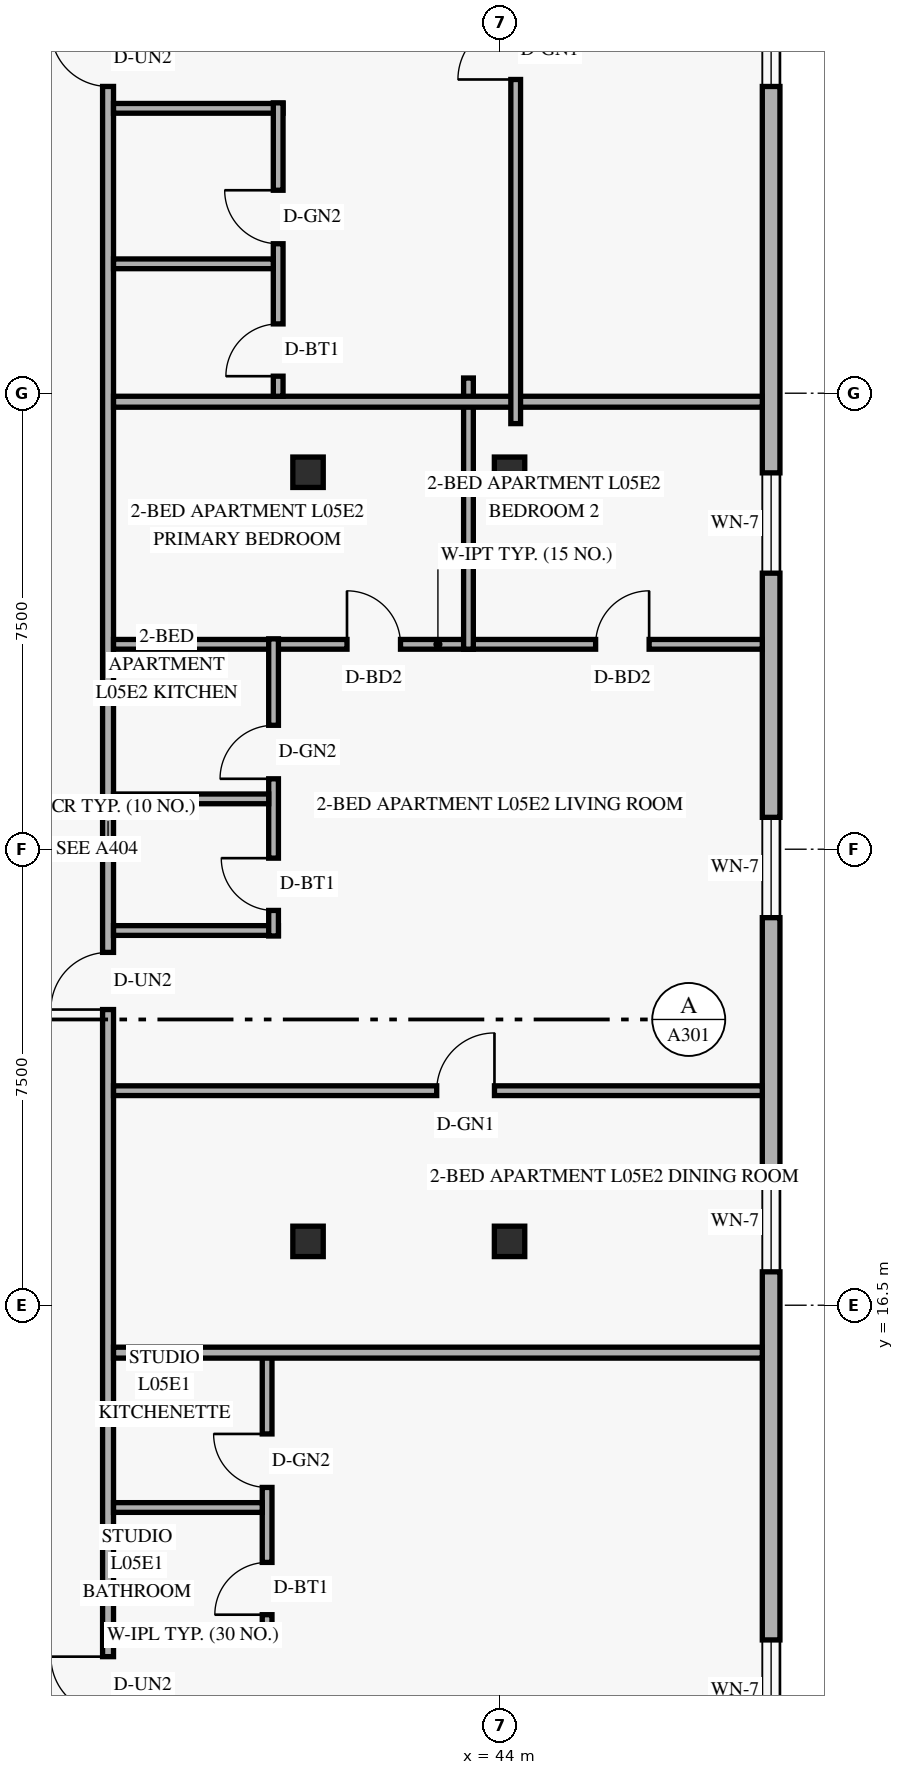
"""IFC4 building model, lengths in metres.
Left out: names, types, materials, properties, quantities, classifications, styles, units other than length and angle.
Written with IfcOpenShell. Run it as: python <this file> out.ifc"""

import sys

from ifc_helpers import new_model, si_unit, direction, frame, frame_2d, origin, origin_2d, place, context, subcontext, project, spatial, rectangle, hollow_rectangle, extrude, element, fill, save


model = new_model("IFC4")
c1 = context("Model", 3, precision=1e-05, world=origin(), true_north=direction((0.0, 1.0)))
c2 = subcontext(c1, "Body", "Model", "MODEL_VIEW")
j1 = project(units=[si_unit("LENGTHUNIT", "METRE"), si_unit("PLANEANGLEUNIT", "RADIAN")], contexts=[c1])
p1 = place(None, origin())
s1 = spatial("IfcSite", under=j1, at=p1, CompositionType="ELEMENT")
p2 = place(p1, origin())
s2 = spatial("IfcBuilding", under=s1, at=p2, CompositionType="ELEMENT")
p3 = place(p2, frame((0.0, 0.0, 24.0)))
s3 = spatial("IfcBuildingStorey", under=s2, at=p3, CompositionType="ELEMENT", Elevation=24.0)
for number, where, z_axis, x_axis in (
    (1, (40.776, 17.55, 0.0), (0.035, 0.0, 0.999), (0.0, 1.0, 0.0)),
    (2, (40.776, 30.2, 0.0), (0.035, 0.0, 0.999), (0.0, 1.0, 0.0)),
):
    element("IfcColumn", number, at=place(p3, frame(where, z_axis=z_axis, x_axis=x_axis)), inside=s3, PredefinedType="COLUMN", context=c2, shape_type="SweptSolid", body=[
        extrude(hollow_rectangle(XDim=0.5, YDim=0.5, WallThickness=0.022, at=origin_2d()), origin(), (0.0, 0.0, 1.0), 3.602),
    ])
for number, where, z_axis, x_axis in (
    (3, (44.049, 17.55, 0.0), (0.058, 0.0, 0.998), (0.0, 1.0, 0.0)),
    (4, (44.049, 30.2, 0.0), (0.058, 0.0, 0.998), (0.0, 1.0, 0.0)),
):
    element("IfcColumn", number, at=place(p3, frame(where, z_axis=z_axis, x_axis=x_axis)), inside=s3, PredefinedType="COLUMN", context=c2, shape_type="SweptSolid", body=[
        extrude(hollow_rectangle(XDim=0.5, YDim=0.5, WallThickness=0.022, at=origin_2d()), origin(), (0.0, 0.0, 1.0), 3.606),
    ])
p4 = place(p3, frame((48.455, 4.62, 0.0), z_axis=(0.0, 0.0, 1.0), x_axis=(0.0, 1.0, 0.0)))
e5 = element("IfcWall", 5, at=p4, inside=s3, PredefinedType="SOLIDWALL", context=c2, shape_type="SweptSolid", body=[
    extrude(rectangle(XDim=38.76, YDim=0.29, at=frame_2d((19.38, 0.0))), origin(), (0.0, 0.0, 1.0), 3.36),
])
p5 = place(p4, frame((4.725, 0.0, 0.85)))
e6 = element("IfcOpeningElement", 6, at=p5, cuts=e5, PredefinedType="OPENING", context=c2, shape_type="SweptSolid", body=[
    extrude(rectangle(XDim=1.65, YDim=1.6, at=frame_2d((0.825, 0.8))), frame((0.0, 0.155, 0.0), z_axis=(0.0, -1.0, 0.0), x_axis=(1.0, 0.0, 0.0)), (0.0, 0.0, 1.0), 0.31),
])
p6 = place(p4, frame((12.429, 0.0, 0.85)))
e7 = element("IfcOpeningElement", 7, at=p6, cuts=e5, PredefinedType="OPENING", context=c2, shape_type="SweptSolid", body=[
    extrude(rectangle(XDim=1.65, YDim=1.6, at=frame_2d((0.825, 0.8))), frame((0.0, 0.155, 0.0), z_axis=(0.0, -1.0, 0.0), x_axis=(1.0, 0.0, 0.0)), (0.0, 0.0, 1.0), 0.31),
])
p7 = place(p4, frame((18.254, 0.0, 0.85)))
e8 = element("IfcOpeningElement", 8, at=p7, cuts=e5, PredefinedType="OPENING", context=c2, shape_type="SweptSolid", body=[
    extrude(rectangle(XDim=1.65, YDim=1.6, at=frame_2d((0.825, 0.8))), frame((0.0, 0.155, 0.0), z_axis=(0.0, -1.0, 0.0), x_axis=(1.0, 0.0, 0.0)), (0.0, 0.0, 1.0), 0.31),
])
p8 = place(p4, frame((23.92, 0.0, 0.85)))
e9 = element("IfcOpeningElement", 9, at=p8, cuts=e5, PredefinedType="OPENING", context=c2, shape_type="SweptSolid", body=[
    extrude(rectangle(XDim=1.65, YDim=1.6, at=frame_2d((0.825, 0.8))), frame((0.0, 0.155, 0.0), z_axis=(0.0, -1.0, 0.0), x_axis=(1.0, 0.0, 0.0)), (0.0, 0.0, 1.0), 0.31),
])
p9 = place(p4, frame((31.925, 0.0, 0.85)))
e10 = element("IfcOpeningElement", 10, at=p9, cuts=e5, PredefinedType="OPENING", context=c2, shape_type="SweptSolid", body=[
    extrude(rectangle(XDim=1.65, YDim=1.6, at=frame_2d((0.825, 0.8))), frame((0.0, 0.155, 0.0), z_axis=(0.0, -1.0, 0.0), x_axis=(1.0, 0.0, 0.0)), (0.0, 0.0, 1.0), 0.31),
])
p10 = place(p3, frame((37.55, 1.29, 0.0), z_axis=(0.0, 0.0, 1.0), x_axis=(0.0, 1.0, 0.0)))
e11 = element("IfcWall", 11, at=p10, inside=s3, PredefinedType="STANDARD", context=c2, shape_type="SweptSolid", body=[
    extrude(rectangle(XDim=45.42, YDim=0.18, at=frame_2d((22.71, 0.0))), origin(), (0.0, 0.0, 1.0), 2.649),
])
p11 = place(p10, frame((8.49, 0.0, 0.0)))
e12 = element("IfcOpeningElement", 12, at=p11, cuts=e11, PredefinedType="OPENING", context=c2, shape_type="SweptSolid", body=[
    extrude(rectangle(XDim=0.94, YDim=2.15, at=frame_2d((0.47, 1.075))), frame((0.0, 0.1, 0.0), z_axis=(0.0, -1.0, 0.0), x_axis=(1.0, 0.0, 0.0)), (0.0, 0.0, 1.0), 0.2),
])
p12 = place(p10, frame((20.073, 0.0, 0.0)))
e13 = element("IfcOpeningElement", 13, at=p12, cuts=e11, PredefinedType="OPENING", context=c2, shape_type="SweptSolid", body=[
    extrude(rectangle(XDim=0.94, YDim=2.15, at=frame_2d((0.47, 1.075))), frame((0.0, 0.1, 0.0), z_axis=(0.0, -1.0, 0.0), x_axis=(1.0, 0.0, 0.0)), (0.0, 0.0, 1.0), 0.2),
])
p13 = place(p10, frame((35.256, 0.0, 0.0)))
e14 = element("IfcOpeningElement", 14, at=p13, cuts=e11, PredefinedType="OPENING", context=c2, shape_type="SweptSolid", body=[
    extrude(rectangle(XDim=0.94, YDim=2.15, at=frame_2d((0.47, 1.075))), frame((0.0, 0.1, 0.0), z_axis=(0.0, -1.0, 0.0), x_axis=(1.0, 0.0, 0.0)), (0.0, 0.0, 1.0), 0.2),
])
p14 = place(p3, frame((37.64, 11.08, 0.0), z_axis=(0.0, 0.0, 1.0), x_axis=(1.0, 0.0, 0.0)))
e15 = element("IfcWall", 15, at=p14, inside=s3, PredefinedType="PLUMBINGWALL", context=c2, shape_type="SweptSolid", body=[
    extrude(rectangle(XDim=2.606, YDim=0.16, at=frame_2d((1.303, 0.0))), origin(), (0.0, 0.0, 1.0), 3.36),
])
p15 = place(p3, frame((40.166, 10.99, 0.0), z_axis=(0.0, 0.0, 1.0), x_axis=(0.0, 1.0, 0.0)))
e16 = element("IfcWall", 16, at=p15, inside=s3, PredefinedType="PLUMBINGWALL", context=c2, shape_type="SweptSolid", body=[
    extrude(rectangle(XDim=4.73, YDim=0.16, at=frame_2d((2.365, 0.0))), origin(), (0.0, 0.0, 1.0), 2.932),
])
p16 = place(p15, frame((0.42, 0.0, 0.0)))
e17 = element("IfcOpeningElement", 17, at=p16, cuts=e16, PredefinedType="OPENING", context=c2, shape_type="SweptSolid", body=[
    extrude(rectangle(XDim=0.86, YDim=2.12, at=frame_2d((0.43, 1.06))), frame((0.0, 0.09, 0.0), z_axis=(0.0, -1.0, 0.0), x_axis=(1.0, 0.0, 0.0)), (0.0, 0.0, 1.0), 0.18),
])
p17 = place(p15, frame((2.513, 0.0, 0.0)))
e18 = element("IfcOpeningElement", 18, at=p17, cuts=e16, PredefinedType="OPENING", context=c2, shape_type="SweptSolid", body=[
    extrude(rectangle(XDim=0.88, YDim=2.12, at=frame_2d((0.44, 1.06))), frame((0.0, 0.09, 0.0), z_axis=(0.0, -1.0, 0.0), x_axis=(1.0, 0.0, 0.0)), (0.0, 0.0, 1.0), 0.18),
])
p18 = place(p3, frame((37.64, 13.173, 0.0), z_axis=(0.0, 0.0, 1.0), x_axis=(1.0, 0.0, 0.0)))
e19 = element("IfcWall", 19, at=p18, inside=s3, PredefinedType="PLUMBINGWALL", context=c2, shape_type="SweptSolid", body=[
    extrude(rectangle(XDim=2.446, YDim=0.16, at=frame_2d((1.223, 0.0))), origin(), (0.0, 0.0, 1.0), 3.36),
])
p19 = place(p3, frame((37.64, 15.72, 0.0), z_axis=(0.0, 0.0, 1.0), x_axis=(1.0, 0.0, 0.0)))
e20 = element("IfcWall", 20, at=p19, inside=s3, PredefinedType="PARTITIONING", context=c2, shape_type="SweptSolid", body=[
    extrude(rectangle(XDim=10.67, YDim=0.18, at=frame_2d((5.335, 0.0))), origin(), (0.0, 0.0, 1.0), 2.649),
])
p20 = place(p3, frame((37.64, 27.37, 0.0), z_axis=(0.0, 0.0, 1.0), x_axis=(1.0, 0.0, 0.0)))
e21 = element("IfcWall", 21, at=p20, inside=s3, PredefinedType="PARTITIONING", context=c2, shape_type="SweptSolid", body=[
    extrude(rectangle(XDim=10.67, YDim=0.16, at=frame_2d((5.335, 0.0))), origin(), (0.0, 0.0, 1.0), 2.649),
])
p21 = place(p20, frame((3.84, 0.0, 0.0)))
e22 = element("IfcOpeningElement", 22, at=p21, cuts=e21, PredefinedType="OPENING", context=c2, shape_type="SweptSolid", body=[
    extrude(rectangle(XDim=0.88, YDim=2.14, at=frame_2d((0.44, 1.07))), frame((0.0, 0.09, 0.0), z_axis=(0.0, -1.0, 0.0), x_axis=(1.0, 0.0, 0.0)), (0.0, 0.0, 1.0), 0.18),
])
p22 = place(p20, frame((7.929, 0.0, 0.0)))
e23 = element("IfcOpeningElement", 23, at=p22, cuts=e21, PredefinedType="OPENING", context=c2, shape_type="SweptSolid", body=[
    extrude(rectangle(XDim=0.88, YDim=2.14, at=frame_2d((0.44, 1.07))), frame((0.0, 0.09, 0.0), z_axis=(0.0, -1.0, 0.0), x_axis=(1.0, 0.0, 0.0)), (0.0, 0.0, 1.0), 0.18),
])
p23 = place(p3, frame((37.64, 22.663, 0.0), z_axis=(0.0, 0.0, 1.0), x_axis=(1.0, 0.0, 0.0)))
e24 = element("IfcWall", 24, at=p23, inside=s3, PredefinedType="PLUMBINGWALL", context=c2, shape_type="SweptSolid", body=[
    extrude(rectangle(XDim=2.712, YDim=0.16, at=frame_2d((1.356, 0.0))), origin(), (0.0, 0.0, 1.0), 3.36),
])
p24 = place(p3, frame((40.272, 22.573, 0.0), z_axis=(0.0, 0.0, 1.0), x_axis=(0.0, 1.0, 0.0)))
e25 = element("IfcWall", 25, at=p24, inside=s3, PredefinedType="PLUMBINGWALL", context=c2, shape_type="SweptSolid", body=[
    extrude(rectangle(XDim=4.887, YDim=0.16, at=frame_2d((2.443, 0.0))), origin(), (0.0, 0.0, 1.0), 3.36),
])
p25 = place(p24, frame((0.42, 0.0, 0.0)))
e26 = element("IfcOpeningElement", 26, at=p25, cuts=e25, PredefinedType="OPENING", context=c2, shape_type="SweptSolid", body=[
    extrude(rectangle(XDim=0.86, YDim=2.12, at=frame_2d((0.43, 1.06))), frame((0.0, 0.09, 0.0), z_axis=(0.0, -1.0, 0.0), x_axis=(1.0, 0.0, 0.0)), (0.0, 0.0, 1.0), 0.18),
])
p26 = place(p24, frame((2.585, 0.0, 0.0)))
e27 = element("IfcOpeningElement", 27, at=p26, cuts=e25, PredefinedType="OPENING", context=c2, shape_type="SweptSolid", body=[
    extrude(rectangle(XDim=0.88, YDim=2.12, at=frame_2d((0.44, 1.06))), frame((0.0, 0.09, 0.0), z_axis=(0.0, -1.0, 0.0), x_axis=(1.0, 0.0, 0.0)), (0.0, 0.0, 1.0), 0.18),
])
p27 = place(p3, frame((37.64, 24.828, 0.0), z_axis=(0.0, 0.0, 1.0), x_axis=(1.0, 0.0, 0.0)))
e28 = element("IfcWall", 28, at=p27, inside=s3, PredefinedType="PLUMBINGWALL", context=c2, shape_type="SweptSolid", body=[
    extrude(rectangle(XDim=2.552, YDim=0.16, at=frame_2d((1.276, 0.0))), origin(), (0.0, 0.0, 1.0), 3.36),
])
p28 = place(p3, frame((37.64, 20.029, 0.0), z_axis=(0.0, 0.0, 1.0), x_axis=(1.0, 0.0, 0.0)))
e29 = element("IfcWall", 29, at=p28, inside=s3, PredefinedType="PARTITIONING", context=c2, shape_type="SweptSolid", body=[
    extrude(rectangle(XDim=10.67, YDim=0.16, at=frame_2d((5.335, 0.0))), origin(), (0.0, 0.0, 1.0), 2.649),
])
p29 = place(p28, frame((5.315, 0.0, 0.0)))
e30 = element("IfcOpeningElement", 30, at=p29, cuts=e29, PredefinedType="OPENING", context=c2, shape_type="SweptSolid", body=[
    extrude(rectangle(XDim=0.95, YDim=2.15, at=frame_2d((0.475, 1.075))), frame((0.0, 0.09, 0.0), z_axis=(0.0, -1.0, 0.0), x_axis=(1.0, 0.0, 0.0)), (0.0, 0.0, 1.0), 0.18),
])
p30 = place(p3, frame((43.477, 27.29, 0.0), z_axis=(0.0, 0.0, 1.0), x_axis=(0.0, 1.0, 0.0)))
e31 = element("IfcWall", 31, at=p30, inside=s3, PredefinedType="PARTITIONING", context=c2, shape_type="SweptSolid", body=[
    extrude(rectangle(XDim=4.46, YDim=0.16, at=frame_2d((2.23, 0.0))), origin(), (0.0, 0.0, 1.0), 2.649),
])
p31 = place(p3, frame((37.64, 31.36, 0.0), z_axis=(0.0, 0.0, 1.0), x_axis=(1.0, 0.0, 0.0)))
e32 = element("IfcWall", 32, at=p31, inside=s3, PredefinedType="PARTITIONING", context=c2, shape_type="SweptSolid", body=[
    extrude(rectangle(XDim=10.67, YDim=0.18, at=frame_2d((5.335, 0.0))), origin(), (0.0, 0.0, 1.0), 2.649),
])
p32 = place(p3, frame((37.64, 36.186, 0.0), z_axis=(0.0, 0.0, 1.0), x_axis=(1.0, 0.0, 0.0)))
e33 = element("IfcWall", 33, at=p32, inside=s3, PredefinedType="PLUMBINGWALL", context=c2, shape_type="SweptSolid", body=[
    extrude(rectangle(XDim=2.788, YDim=0.16, at=frame_2d((1.394, 0.0))), origin(), (0.0, 0.0, 1.0), 3.36),
])
p33 = place(p3, frame((40.348, 31.45, 0.0), z_axis=(0.0, 0.0, 1.0), x_axis=(0.0, 1.0, 0.0)))
e34 = element("IfcWall", 34, at=p33, inside=s3, PredefinedType="PLUMBINGWALL", context=c2, shape_type="SweptSolid", body=[
    extrude(rectangle(XDim=4.825, YDim=0.16, at=frame_2d((2.413, 0.0))), origin(), (0.0, 0.0, 1.0), 2.932),
])
p34 = place(p33, frame((0.33, 0.0, 0.0)))
e35 = element("IfcOpeningElement", 35, at=p34, cuts=e34, PredefinedType="OPENING", context=c2, shape_type="SweptSolid", body=[
    extrude(rectangle(XDim=0.86, YDim=2.12, at=frame_2d((0.43, 1.06))), frame((0.0, 0.09, 0.0), z_axis=(0.0, -1.0, 0.0), x_axis=(1.0, 0.0, 0.0)), (0.0, 0.0, 1.0), 0.18),
])
p35 = place(p33, frame((2.508, 0.0, 0.0)))
e36 = element("IfcOpeningElement", 36, at=p35, cuts=e34, PredefinedType="OPENING", context=c2, shape_type="SweptSolid", body=[
    extrude(rectangle(XDim=0.88, YDim=2.12, at=frame_2d((0.44, 1.06))), frame((0.0, 0.09, 0.0), z_axis=(0.0, -1.0, 0.0), x_axis=(1.0, 0.0, 0.0)), (0.0, 0.0, 1.0), 0.18),
])
p36 = place(p3, frame((37.64, 33.628, 0.0), z_axis=(0.0, 0.0, 1.0), x_axis=(1.0, 0.0, 0.0)))
e37 = element("IfcWall", 37, at=p36, inside=s3, PredefinedType="PLUMBINGWALL", context=c2, shape_type="SweptSolid", body=[
    extrude(rectangle(XDim=2.628, YDim=0.16, at=frame_2d((1.314, 0.0))), origin(), (0.0, 0.0, 1.0), 3.36),
])
p37 = place(p3, frame((44.254, 31.0, 0.0), z_axis=(0.0, 0.0, 1.0), x_axis=(0.0, 1.0, 0.0)))
e38 = element("IfcWall", 38, at=p37, inside=s3, PredefinedType="PARTITIONING", context=c2, shape_type="SweptSolid", body=[
    extrude(rectangle(XDim=12.84, YDim=0.16, at=frame_2d((6.42, 0.0))), origin(), (0.0, 0.0, 1.0), 2.809),
])
p38 = place(p37, frame((5.66, 0.0, 0.0)))
e39 = element("IfcOpeningElement", 39, at=p38, cuts=e38, PredefinedType="OPENING", context=c2, shape_type="SweptSolid", body=[
    extrude(rectangle(XDim=0.95, YDim=2.15, at=frame_2d((0.475, 1.075))), frame((0.0, 0.09, 0.0), z_axis=(0.0, -1.0, 0.0), x_axis=(1.0, 0.0, 0.0)), (0.0, 0.0, 1.0), 0.18),
])
p39 = place(p5, origin())
e40 = element("IfcWindow", 40, at=p39, inside=s3, PartitioningType="SINGLE_PANEL", PredefinedType="WINDOW", context=c2, shape_type="SweptSolid", body=[
    extrude(rectangle(XDim=1.65, YDim=1.6, at=frame_2d((0.825, 0.8))), frame((0.0, 0.03, 0.0), z_axis=(0.0, -1.0, 0.0), x_axis=(1.0, 0.0, 0.0)), (0.0, 0.0, 1.0), 0.06),
])
fill(e6, e40)
p40 = place(p6, origin())
e41 = element("IfcWindow", 41, at=p40, inside=s3, PartitioningType="SINGLE_PANEL", PredefinedType="WINDOW", context=c2, shape_type="SweptSolid", body=[
    extrude(rectangle(XDim=1.65, YDim=1.6, at=frame_2d((0.825, 0.8))), frame((0.0, 0.03, 0.0), z_axis=(0.0, -1.0, 0.0), x_axis=(1.0, 0.0, 0.0)), (0.0, 0.0, 1.0), 0.06),
])
fill(e7, e41)
p41 = place(p7, origin())
e42 = element("IfcWindow", 42, at=p41, inside=s3, PartitioningType="SINGLE_PANEL", PredefinedType="WINDOW", context=c2, shape_type="SweptSolid", body=[
    extrude(rectangle(XDim=1.65, YDim=1.6, at=frame_2d((0.825, 0.8))), frame((0.0, 0.03, 0.0), z_axis=(0.0, -1.0, 0.0), x_axis=(1.0, 0.0, 0.0)), (0.0, 0.0, 1.0), 0.06),
])
fill(e8, e42)
p42 = place(p8, origin())
e43 = element("IfcWindow", 43, at=p42, inside=s3, PartitioningType="SINGLE_PANEL", PredefinedType="WINDOW", context=c2, shape_type="SweptSolid", body=[
    extrude(rectangle(XDim=1.65, YDim=1.6, at=frame_2d((0.825, 0.8))), frame((0.0, 0.03, 0.0), z_axis=(0.0, -1.0, 0.0), x_axis=(1.0, 0.0, 0.0)), (0.0, 0.0, 1.0), 0.06),
])
fill(e9, e43)
p43 = place(p9, origin())
e44 = element("IfcWindow", 44, at=p43, inside=s3, PartitioningType="SINGLE_PANEL", PredefinedType="WINDOW", context=c2, shape_type="SweptSolid", body=[
    extrude(rectangle(XDim=1.65, YDim=1.6, at=frame_2d((0.825, 0.8))), frame((0.0, 0.03, 0.0), z_axis=(0.0, -1.0, 0.0), x_axis=(1.0, 0.0, 0.0)), (0.0, 0.0, 1.0), 0.06),
])
fill(e10, e44)
p44 = place(p11, origin())
e45 = element("IfcDoor", 45, at=p44, inside=s3, OperationType="SINGLE_SWING_RIGHT", PredefinedType="DOOR", context=c2, shape_type="SweptSolid", body=[
    extrude(rectangle(XDim=0.94, YDim=2.15, at=frame_2d((0.47, 1.075))), frame((0.0, 0.025, 0.0), z_axis=(0.0, -1.0, 0.0), x_axis=(1.0, 0.0, 0.0)), (0.0, 0.0, 1.0), 0.05),
])
fill(e12, e45)
p45 = place(p16, origin())
e46 = element("IfcDoor", 46, at=p45, inside=s3, OperationType="SINGLE_SWING_LEFT", PredefinedType="DOOR", context=c2, shape_type="SweptSolid", body=[
    extrude(rectangle(XDim=0.86, YDim=2.12, at=frame_2d((0.43, 1.06))), frame((0.0, 0.025, 0.0), z_axis=(0.0, -1.0, 0.0), x_axis=(1.0, 0.0, 0.0)), (0.0, 0.0, 1.0), 0.05),
])
fill(e17, e46)
p46 = place(p17, origin())
e47 = element("IfcDoor", 47, at=p46, inside=s3, OperationType="SINGLE_SWING_RIGHT", PredefinedType="DOOR", context=c2, shape_type="SweptSolid", body=[
    extrude(rectangle(XDim=0.88, YDim=2.12, at=frame_2d((0.44, 1.06))), frame((0.0, 0.025, 0.0), z_axis=(0.0, -1.0, 0.0), x_axis=(1.0, 0.0, 0.0)), (0.0, 0.0, 1.0), 0.05),
])
fill(e18, e47)
p47 = place(p29, origin())
e48 = element("IfcDoor", 48, at=p47, inside=s3, OperationType="SINGLE_SWING_RIGHT", PredefinedType="DOOR", context=c2, shape_type="SweptSolid", body=[
    extrude(rectangle(XDim=0.95, YDim=2.15, at=frame_2d((0.475, 1.075))), frame((0.0, 0.025, 0.0), z_axis=(0.0, -1.0, 0.0), x_axis=(1.0, 0.0, 0.0)), (0.0, 0.0, 1.0), 0.05),
])
fill(e30, e48)
p48 = place(p12, origin())
e49 = element("IfcDoor", 49, at=p48, inside=s3, OperationType="SINGLE_SWING_LEFT", PredefinedType="DOOR", context=c2, shape_type="SweptSolid", body=[
    extrude(rectangle(XDim=0.94, YDim=2.15, at=frame_2d((0.47, 1.075))), frame((0.0, 0.025, 0.0), z_axis=(0.0, -1.0, 0.0), x_axis=(1.0, 0.0, 0.0)), (0.0, 0.0, 1.0), 0.05),
])
fill(e13, e49)
p49 = place(p25, origin())
e50 = element("IfcDoor", 50, at=p49, inside=s3, OperationType="SINGLE_SWING_RIGHT", PredefinedType="DOOR", context=c2, shape_type="SweptSolid", body=[
    extrude(rectangle(XDim=0.86, YDim=2.12, at=frame_2d((0.43, 1.06))), frame((0.0, 0.025, 0.0), z_axis=(0.0, -1.0, 0.0), x_axis=(1.0, 0.0, 0.0)), (0.0, 0.0, 1.0), 0.05),
])
fill(e26, e50)
p50 = place(p26, origin())
e51 = element("IfcDoor", 51, at=p50, inside=s3, OperationType="SINGLE_SWING_LEFT", PredefinedType="DOOR", context=c2, shape_type="SweptSolid", body=[
    extrude(rectangle(XDim=0.88, YDim=2.12, at=frame_2d((0.44, 1.06))), frame((0.0, 0.025, 0.0), z_axis=(0.0, -1.0, 0.0), x_axis=(1.0, 0.0, 0.0)), (0.0, 0.0, 1.0), 0.05),
])
fill(e27, e51)
p51 = place(p21, origin())
e52 = element("IfcDoor", 52, at=p51, inside=s3, OperationType="SINGLE_SWING_LEFT", PredefinedType="DOOR", context=c2, shape_type="SweptSolid", body=[
    extrude(rectangle(XDim=0.88, YDim=2.14, at=frame_2d((0.44, 1.07))), frame((0.0, 0.025, 0.0), z_axis=(0.0, -1.0, 0.0), x_axis=(1.0, 0.0, 0.0)), (0.0, 0.0, 1.0), 0.05),
])
fill(e22, e52)
p52 = place(p22, origin())
e53 = element("IfcDoor", 53, at=p52, inside=s3, OperationType="SINGLE_SWING_RIGHT", PredefinedType="DOOR", context=c2, shape_type="SweptSolid", body=[
    extrude(rectangle(XDim=0.88, YDim=2.14, at=frame_2d((0.44, 1.07))), frame((0.0, 0.025, 0.0), z_axis=(0.0, -1.0, 0.0), x_axis=(1.0, 0.0, 0.0)), (0.0, 0.0, 1.0), 0.05),
])
fill(e23, e53)
p53 = place(p38, origin())
e54 = element("IfcDoor", 54, at=p53, inside=s3, OperationType="SINGLE_SWING_LEFT", PredefinedType="DOOR", context=c2, shape_type="SweptSolid", body=[
    extrude(rectangle(XDim=0.95, YDim=2.15, at=frame_2d((0.475, 1.075))), frame((0.0, 0.025, 0.0), z_axis=(0.0, -1.0, 0.0), x_axis=(1.0, 0.0, 0.0)), (0.0, 0.0, 1.0), 0.05),
])
fill(e39, e54)
p54 = place(p13, origin())
e55 = element("IfcDoor", 55, at=p54, inside=s3, OperationType="SINGLE_SWING_RIGHT", PredefinedType="DOOR", context=c2, shape_type="SweptSolid", body=[
    extrude(rectangle(XDim=0.94, YDim=2.15, at=frame_2d((0.47, 1.075))), frame((0.0, 0.025, 0.0), z_axis=(0.0, -1.0, 0.0), x_axis=(1.0, 0.0, 0.0)), (0.0, 0.0, 1.0), 0.05),
])
fill(e14, e55)
p55 = place(p34, origin())
e56 = element("IfcDoor", 56, at=p55, inside=s3, OperationType="SINGLE_SWING_LEFT", PredefinedType="DOOR", context=c2, shape_type="SweptSolid", body=[
    extrude(rectangle(XDim=0.86, YDim=2.12, at=frame_2d((0.43, 1.06))), frame((0.0, 0.025, 0.0), z_axis=(0.0, -1.0, 0.0), x_axis=(1.0, 0.0, 0.0)), (0.0, 0.0, 1.0), 0.05),
])
fill(e35, e56)
p56 = place(p35, origin())
e57 = element("IfcDoor", 57, at=p56, inside=s3, OperationType="SINGLE_SWING_RIGHT", PredefinedType="DOOR", context=c2, shape_type="SweptSolid", body=[
    extrude(rectangle(XDim=0.88, YDim=2.12, at=frame_2d((0.44, 1.06))), frame((0.0, 0.025, 0.0), z_axis=(0.0, -1.0, 0.0), x_axis=(1.0, 0.0, 0.0)), (0.0, 0.0, 1.0), 0.05),
])
fill(e36, e57)
save(model, sys.argv[1])
